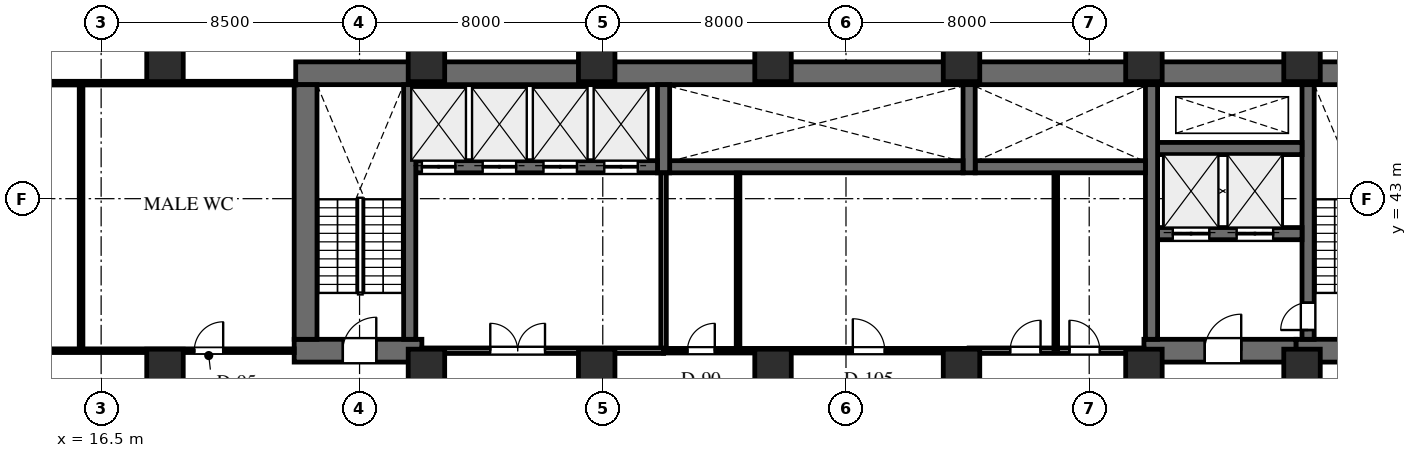
"""IFC4 building model, lengths in metres.
Left out: names, types, materials, properties, quantities, classifications, styles, units other than length and angle.
Written with IfcOpenShell. Run it as: python <this file> out.ifc"""

import sys

from ifc_helpers import new_model, si_unit, direction, frame, frame_2d, origin, origin_2d, place, context, subcontext, project, spatial, rectangle, extrude, element, fill, save


model = new_model("IFC4")
c1 = context("Model", 3, precision=1e-05, world=origin(), true_north=direction((0.0, 1.0)))
c2 = subcontext(c1, "Body", "Model", "MODEL_VIEW")
j1 = project(units=[si_unit("LENGTHUNIT", "METRE"), si_unit("PLANEANGLEUNIT", "RADIAN")], contexts=[c1])
p1 = place(None, origin())
s1 = spatial("IfcSite", under=j1, at=p1, CompositionType="ELEMENT")
p2 = place(p1, origin())
s2 = spatial("IfcBuilding", under=s1, at=p2, CompositionType="ELEMENT")
p3 = place(p2, frame((0.0, 0.0, 37.5)))
s3 = spatial("IfcBuildingStorey", under=s2, at=p3, CompositionType="ELEMENT", Elevation=37.5)
p4 = place(p3, frame((22.9, 47.125, 0.0), z_axis=(0.0, 0.0, 1.0), x_axis=(1.0, 0.0, 0.0)))
e1 = element("IfcWall", 1, at=p4, inside=s3, PredefinedType="SHEAR", context=c2, shape_type="SweptSolid", body=[
    extrude(rectangle(XDim=43.7, YDim=0.75, at=frame_2d((21.85, 0.0))), origin(), (0.0, 0.0, 1.0), 4.0),
])
p5 = place(p3, frame((55.8, 38.0, 0.0), z_axis=(0.0, 0.0, 1.0), x_axis=(1.0, 0.0, 0.0)))
e2 = element("IfcWall", 2, at=p5, inside=s3, PredefinedType="SHEAR", context=c2, shape_type="SweptSolid", body=[
    extrude(rectangle(XDim=10.8, YDim=0.75, at=frame_2d((5.4, 0.0))), origin(), (0.0, 0.0, 1.0), 4.0),
])
p6 = place(p5, frame((1.5, 0.0, 0.0)))
e3 = element("IfcOpeningElement", 3, at=p6, cuts=e2, PredefinedType="OPENING", context=c2, shape_type="SweptSolid", body=[
    extrude(rectangle(XDim=1.1, YDim=2.2, at=frame_2d((0.55, 1.1))), frame((0.0, 0.385, 0.0), z_axis=(0.0, -1.0, 0.0), x_axis=(1.0, 0.0, 0.0)), (0.0, 0.0, 1.0), 0.77),
])
p7 = place(p5, frame((4.82, 0.0, 0.0)))
e4 = element("IfcOpeningElement", 4, at=p7, cuts=e2, PredefinedType="OPENING", context=c2, shape_type="SweptSolid", body=[
    extrude(rectangle(XDim=1.0, YDim=2.15, at=frame_2d((0.5, 1.075))), frame((0.0, 0.385, 0.0), z_axis=(0.0, -1.0, 0.0), x_axis=(1.0, 0.0, 0.0)), (0.0, 0.0, 1.0), 0.77),
])
p8 = place(p5, frame((8.05, 0.0, 0.0)))
e5 = element("IfcOpeningElement", 5, at=p8, cuts=e2, PredefinedType="OPENING", context=c2, shape_type="SweptSolid", body=[
    extrude(rectangle(XDim=1.1, YDim=2.2, at=frame_2d((0.55, 1.1))), frame((0.0, 0.385, 0.0), z_axis=(0.0, -1.0, 0.0), x_axis=(1.0, 0.0, 0.0)), (0.0, 0.0, 1.0), 0.77),
])
p9 = place(p3, frame((56.2, 38.375, 0.0), z_axis=(0.0, 0.0, 1.0), x_axis=(0.0, 1.0, 0.0)))
e6 = element("IfcWall", 6, at=p9, inside=s3, PredefinedType="SHEAR", context=c2, shape_type="SweptSolid", body=[
    extrude(rectangle(XDim=8.375, YDim=0.4, at=frame_2d((4.188, 0.0))), origin(), (0.0, 0.0, 1.0), 4.0),
])
p10 = place(p9, frame((0.305, 0.0, 0.0)))
e7 = element("IfcOpeningElement", 7, at=p10, cuts=e6, PredefinedType="OPENING", context=c2, shape_type="SweptSolid", body=[
    extrude(rectangle(XDim=0.9, YDim=2.15, at=frame_2d((0.45, 1.075))), frame((0.0, 0.21, 0.0), z_axis=(0.0, -1.0, 0.0), x_axis=(1.0, 0.0, 0.0)), (0.0, 0.0, 1.0), 0.42),
])
p11 = place(p3, frame((50.8, 38.0, 0.0), z_axis=(0.0, 0.0, 1.0), x_axis=(1.0, 0.0, 0.0)))
e8 = element("IfcWall", 8, at=p11, inside=s3, PredefinedType="SHEAR", context=c2, shape_type="SweptSolid", body=[
    extrude(rectangle(XDim=5.0, YDim=0.75, at=frame_2d((2.5, 0.0))), origin(), (0.0, 0.0, 1.0), 4.0),
])
p12 = place(p11, frame((2.0, 0.0, 0.0)))
e9 = element("IfcOpeningElement", 9, at=p12, cuts=e8, PredefinedType="OPENING", context=c2, shape_type="SweptSolid", body=[
    extrude(rectangle(XDim=1.2, YDim=2.2, at=frame_2d((0.6, 1.1))), frame((0.0, 0.385, 0.0), z_axis=(0.0, -1.0, 0.0), x_axis=(1.0, 0.0, 0.0)), (0.0, 0.0, 1.0), 0.77),
])
p13 = place(p3, frame((51.25, 41.85, 0.0), z_axis=(0.0, 0.0, 1.0), x_axis=(1.0, 0.0, 0.0)))
e10 = element("IfcWall", 10, at=p13, inside=s3, PredefinedType="SHEAR", context=c2, shape_type="SweptSolid", body=[
    extrude(rectangle(XDim=4.75, YDim=0.4, at=frame_2d((2.375, 0.0))), origin(), (0.0, 0.0, 1.0), 4.0),
])
p14 = place(p13, frame((0.5, 0.0, 0.0)))
e11 = element("IfcOpeningElement", 11, at=p14, cuts=e10, PredefinedType="OPENING", context=c2, shape_type="SweptSolid", body=[
    extrude(rectangle(XDim=1.2, YDim=2.2, at=frame_2d((0.6, 1.1))), frame((0.0, 0.21, 0.0), z_axis=(0.0, -1.0, 0.0), x_axis=(1.0, 0.0, 0.0)), (0.0, 0.0, 1.0), 0.42),
])
p15 = place(p13, frame((2.6, 0.0, 0.0)))
e12 = element("IfcOpeningElement", 12, at=p15, cuts=e10, PredefinedType="OPENING", context=c2, shape_type="SweptSolid", body=[
    extrude(rectangle(XDim=1.2, YDim=2.2, at=frame_2d((0.6, 1.1))), frame((0.0, 0.21, 0.0), z_axis=(0.0, -1.0, 0.0), x_axis=(1.0, 0.0, 0.0)), (0.0, 0.0, 1.0), 0.42),
])
p16 = place(p3, frame((51.25, 44.65, 0.0), z_axis=(0.0, 0.0, 1.0), x_axis=(1.0, 0.0, 0.0)))
e13 = element("IfcWall", 13, at=p16, inside=s3, PredefinedType="SHEAR", context=c2, shape_type="SweptSolid", body=[
    extrude(rectangle(XDim=4.75, YDim=0.4, at=frame_2d((2.375, 0.0))), origin(), (0.0, 0.0, 1.0), 4.0),
])
p17 = place(p3, frame((51.05, 38.375, 0.0), z_axis=(0.0, 0.0, 1.0), x_axis=(0.0, 1.0, 0.0)))
e14 = element("IfcWall", 14, at=p17, inside=s3, PredefinedType="SHEAR", context=c2, shape_type="SweptSolid", body=[
    extrude(rectangle(XDim=8.375, YDim=0.4, at=frame_2d((4.188, 0.0))), origin(), (0.0, 0.0, 1.0), 4.0),
])
p18 = place(p3, frame((45.25, 44.05, 0.0), z_axis=(0.0, 0.0, 1.0), x_axis=(1.0, 0.0, 0.0)))
e15 = element("IfcWall", 15, at=p18, inside=s3, PredefinedType="SHEAR", context=c2, shape_type="SweptSolid", body=[
    extrude(rectangle(XDim=5.6, YDim=0.4, at=frame_2d((2.8, 0.0))), origin(), (0.0, 0.0, 1.0), 4.0),
])
p19 = place(p3, frame((45.05, 43.85, 0.0), z_axis=(0.0, 0.0, 1.0), x_axis=(0.0, 1.0, 0.0)))
e16 = element("IfcWall", 16, at=p19, inside=s3, PredefinedType="SHEAR", context=c2, shape_type="SweptSolid", body=[
    extrude(rectangle(XDim=2.9, YDim=0.4, at=frame_2d((1.45, 0.0))), origin(), (0.0, 0.0, 1.0), 4.0),
])
p20 = place(p3, frame((35.2, 44.05, 0.0), z_axis=(0.0, 0.0, 1.0), x_axis=(1.0, 0.0, 0.0)))
e17 = element("IfcWall", 17, at=p20, inside=s3, PredefinedType="SHEAR", context=c2, shape_type="SweptSolid", body=[
    extrude(rectangle(XDim=9.65, YDim=0.4, at=frame_2d((4.825, 0.0))), origin(), (0.0, 0.0, 1.0), 4.0),
])
p21 = place(p3, frame((35.0, 43.85, 0.0), z_axis=(0.0, 0.0, 1.0), x_axis=(0.0, 1.0, 0.0)))
e18 = element("IfcWall", 18, at=p21, inside=s3, PredefinedType="SHEAR", context=c2, shape_type="SweptSolid", body=[
    extrude(rectangle(XDim=2.9, YDim=0.4, at=frame_2d((1.45, 0.0))), origin(), (0.0, 0.0, 1.0), 4.0),
])
p22 = place(p3, frame((26.85, 44.05, 0.0), z_axis=(0.0, 0.0, 1.0), x_axis=(1.0, 0.0, 0.0)))
e19 = element("IfcWall", 19, at=p22, inside=s3, PredefinedType="SHEAR", context=c2, shape_type="SweptSolid", body=[
    extrude(rectangle(XDim=7.95, YDim=0.4, at=frame_2d((3.975, 0.0))), origin(), (0.0, 0.0, 1.0), 4.0),
])
p23 = place(p22, frame((0.2, 0.0, 0.0)))
e20 = element("IfcOpeningElement", 20, at=p23, cuts=e19, PredefinedType="OPENING", context=c2, shape_type="SweptSolid", body=[
    extrude(rectangle(XDim=1.1, YDim=2.2, at=frame_2d((0.55, 1.1))), frame((0.0, 0.21, 0.0), z_axis=(0.0, -1.0, 0.0), x_axis=(1.0, 0.0, 0.0)), (0.0, 0.0, 1.0), 0.42),
])
p24 = place(p22, frame((2.2, 0.0, 0.0)))
e21 = element("IfcOpeningElement", 21, at=p24, cuts=e19, PredefinedType="OPENING", context=c2, shape_type="SweptSolid", body=[
    extrude(rectangle(XDim=1.1, YDim=2.2, at=frame_2d((0.55, 1.1))), frame((0.0, 0.21, 0.0), z_axis=(0.0, -1.0, 0.0), x_axis=(1.0, 0.0, 0.0)), (0.0, 0.0, 1.0), 0.42),
])
p25 = place(p22, frame((4.2, 0.0, 0.0)))
e22 = element("IfcOpeningElement", 22, at=p25, cuts=e19, PredefinedType="OPENING", context=c2, shape_type="SweptSolid", body=[
    extrude(rectangle(XDim=1.1, YDim=2.2, at=frame_2d((0.55, 1.1))), frame((0.0, 0.21, 0.0), z_axis=(0.0, -1.0, 0.0), x_axis=(1.0, 0.0, 0.0)), (0.0, 0.0, 1.0), 0.42),
])
p26 = place(p22, frame((6.2, 0.0, 0.0)))
e23 = element("IfcOpeningElement", 23, at=p26, cuts=e19, PredefinedType="OPENING", context=c2, shape_type="SweptSolid", body=[
    extrude(rectangle(XDim=1.1, YDim=2.2, at=frame_2d((0.55, 1.1))), frame((0.0, 0.21, 0.0), z_axis=(0.0, -1.0, 0.0), x_axis=(1.0, 0.0, 0.0)), (0.0, 0.0, 1.0), 0.42),
])
p27 = place(p3, frame((22.85, 38.0, 0.0), z_axis=(0.0, 0.0, 1.0), x_axis=(1.0, 0.0, 0.0)))
e24 = element("IfcWall", 24, at=p27, inside=s3, PredefinedType="SHEAR", context=c2, shape_type="SweptSolid", body=[
    extrude(rectangle(XDim=4.2, YDim=0.75, at=frame_2d((2.1, 0.0))), origin(), (0.0, 0.0, 1.0), 4.0),
])
p28 = place(p27, frame((1.6, 0.0, 0.0)))
e25 = element("IfcOpeningElement", 25, at=p28, cuts=e24, PredefinedType="OPENING", context=c2, shape_type="SweptSolid", body=[
    extrude(rectangle(XDim=1.1, YDim=2.2, at=frame_2d((0.55, 1.1))), frame((0.0, 0.385, 0.0), z_axis=(0.0, -1.0, 0.0), x_axis=(1.0, 0.0, 0.0)), (0.0, 0.0, 1.0), 0.77),
])
p29 = place(p3, frame((23.225, 38.375, 0.0), z_axis=(0.0, 0.0, 1.0), x_axis=(0.0, 1.0, 0.0)))
e26 = element("IfcWall", 26, at=p29, inside=s3, PredefinedType="SHEAR", context=c2, shape_type="SweptSolid", body=[
    extrude(rectangle(XDim=8.375, YDim=0.75, at=frame_2d((4.188, 0.0))), origin(), (0.0, 0.0, 1.0), 4.0),
])
p30 = place(p3, frame((26.65, 38.375, 0.0), z_axis=(0.0, 0.0, 1.0), x_axis=(0.0, 1.0, 0.0)))
e27 = element("IfcWall", 27, at=p30, inside=s3, PredefinedType="SHEAR", context=c2, shape_type="SweptSolid", body=[
    extrude(rectangle(XDim=8.375, YDim=0.4, at=frame_2d((4.188, 0.0))), origin(), (0.0, 0.0, 1.0), 4.0),
])
for number, where, z_axis, x_axis in (
    (28, (56.0, 47.55, 0.0), (0.0, 0.0, 1.0), (1.0, 0.0, 0.0)),
    (29, (56.0, 37.35, 0.0), (0.0, 0.0, 1.0), (1.0, 0.0, 0.0)),
    (30, (50.8, 47.55, 0.0), (0.0, 0.0, 1.0), (1.0, 0.0, 0.0)),
    (31, (50.8, 37.35, 0.0), (0.0, 0.0, 1.0), (1.0, 0.0, 0.0)),
    (32, (44.8, 37.35, 0.0), (0.0, 0.0, 1.0), (1.0, 0.0, 0.0)),
    (33, (44.8, 47.55, 0.0), (0.0, 0.0, 1.0), (1.0, 0.0, 0.0)),
    (34, (38.6, 37.35, 0.0), (0.0, 0.0, 1.0), (1.0, 0.0, 0.0)),
    (35, (38.6, 47.55, 0.0), (0.0, 0.0, 1.0), (1.0, 0.0, 0.0)),
    (36, (32.8, 37.35, 0.0), (0.0, 0.0, 1.0), (1.0, 0.0, 0.0)),
    (37, (32.8, 47.55, 0.0), (0.0, 0.0, 1.0), (1.0, 0.0, 0.0)),
    (38, (27.2, 37.35, 0.0), (0.0, 0.0, 1.0), (1.0, 0.0, 0.0)),
    (39, (27.2, 47.55, 0.0), (0.0, 0.0, 1.0), (1.0, 0.0, 0.0)),
    (40, (18.6, 37.35, 0.0), (0.0, 0.0, 1.0), (1.0, 0.0, 0.0)),
    (41, (18.6, 47.55, 0.0), (0.0, 0.0, 1.0), (1.0, 0.0, 0.0)),
):
    element("IfcColumn", number, at=place(p3, frame(where, z_axis=z_axis, x_axis=x_axis)), inside=s3, PredefinedType="COLUMN", context=c2, shape_type="SweptSolid", body=[
        extrude(rectangle(XDim=1.2, YDim=1.4, at=origin_2d()), origin(), (0.0, 0.0, 1.0), 4.0),
    ])
p31 = place(p3, frame((45.05, 38.0, 0.0), z_axis=(0.0, 0.0, 1.0), x_axis=(1.0, 0.0, 0.0)))
e42 = element("IfcWall", 42, at=p31, inside=s3, PredefinedType="STANDARD", context=c2, shape_type="SweptSolid", body=[
    extrude(rectangle(XDim=5.75, YDim=0.18, at=frame_2d((2.875, 0.0))), origin(), (0.0, 0.0, 1.0), 2.813),
])
p32 = place(p31, frame((1.35, 0.0, 0.0)))
e43 = element("IfcOpeningElement", 43, at=p32, cuts=e42, PredefinedType="OPENING", context=c2, shape_type="SweptSolid", body=[
    extrude(rectangle(XDim=1.0, YDim=2.15, at=frame_2d((0.5, 1.075))), frame((0.0, 0.1, 0.0), z_axis=(0.0, -1.0, 0.0), x_axis=(1.0, 0.0, 0.0)), (0.0, 0.0, 1.0), 0.2),
])
p33 = place(p31, frame((3.3, 0.0, 0.0)))
e44 = element("IfcOpeningElement", 44, at=p33, cuts=e42, PredefinedType="OPENING", context=c2, shape_type="SweptSolid", body=[
    extrude(rectangle(XDim=1.0, YDim=2.15, at=frame_2d((0.5, 1.075))), frame((0.0, 0.1, 0.0), z_axis=(0.0, -1.0, 0.0), x_axis=(1.0, 0.0, 0.0)), (0.0, 0.0, 1.0), 0.2),
])
p34 = place(p3, frame((47.9, 38.068, 0.0), z_axis=(0.0, 0.0, 1.0), x_axis=(0.0, 1.0, 0.0)))
e45 = element("IfcWall", 45, at=p34, inside=s3, PredefinedType="PARTITIONING", context=c2, shape_type="SweptSolid", body=[
    extrude(rectangle(XDim=5.774, YDim=0.12, at=frame_2d((2.887, 0.0))), origin(), (0.0, 0.0, 1.0), 3.74),
])
p35 = place(p3, frame((35.0, 38.0, 0.0), z_axis=(0.0, 0.0, 1.0), x_axis=(0.0, 1.0, 0.0)))
e46 = element("IfcWall", 46, at=p35, inside=s3, PredefinedType="STANDARD", context=c2, shape_type="SweptSolid", body=[
    extrude(rectangle(XDim=5.85, YDim=0.18, at=frame_2d((2.925, 0.0))), origin(), (0.0, 0.0, 1.0), 3.74),
])
p36 = place(p3, frame((27.05, 38.0, 0.0), z_axis=(0.0, 0.0, 1.0), x_axis=(1.0, 0.0, 0.0)))
e47 = element("IfcWall", 47, at=p36, inside=s3, PredefinedType="STANDARD", context=c2, shape_type="SweptSolid", body=[
    extrude(rectangle(XDim=7.95, YDim=0.18, at=frame_2d((3.975, 0.0))), origin(), (0.0, 0.0, 1.0), 2.813),
])
p37 = place(p36, frame((2.25, 0.0, 0.0)))
e48 = element("IfcOpeningElement", 48, at=p37, cuts=e47, PredefinedType="OPENING", context=c2, shape_type="SweptSolid", body=[
    extrude(rectangle(XDim=1.8, YDim=2.2, at=frame_2d((0.9, 1.1))), frame((0.0, 0.1, 0.0), z_axis=(0.0, -1.0, 0.0), x_axis=(1.0, 0.0, 0.0)), (0.0, 0.0, 1.0), 0.2),
])
p38 = place(p3, frame((35.0, 38.0, 0.0), z_axis=(0.0, 0.0, 1.0), x_axis=(1.0, 0.0, 0.0)))
e49 = element("IfcWall", 49, at=p38, inside=s3, PredefinedType="PARTITIONING", context=c2, shape_type="SweptSolid", body=[
    extrude(rectangle(XDim=10.05, YDim=0.15, at=frame_2d((5.025, 0.0))), origin(), (0.0, 0.0, 1.0), 2.813),
])
p39 = place(p38, frame((0.785, 0.0, 0.0)))
e50 = element("IfcOpeningElement", 50, at=p39, cuts=e49, PredefinedType="OPENING", context=c2, shape_type="SweptSolid", body=[
    extrude(rectangle(XDim=0.9, YDim=2.1, at=frame_2d((0.45, 1.05))), frame((0.0, 0.085, 0.0), z_axis=(0.0, -1.0, 0.0), x_axis=(1.0, 0.0, 0.0)), (0.0, 0.0, 1.0), 0.17),
])
p40 = place(p38, frame((6.225, 0.0, 0.0)))
e51 = element("IfcOpeningElement", 51, at=p40, cuts=e49, PredefinedType="OPENING", context=c2, shape_type="SweptSolid", body=[
    extrude(rectangle(XDim=1.05, YDim=2.2, at=frame_2d((0.525, 1.1))), frame((0.0, 0.085, 0.0), z_axis=(0.0, -1.0, 0.0), x_axis=(1.0, 0.0, 0.0)), (0.0, 0.0, 1.0), 0.17),
])
p41 = place(p3, frame((37.45, 38.068, 0.0), z_axis=(0.0, 0.0, 1.0), x_axis=(0.0, 1.0, 0.0)))
e52 = element("IfcWall", 52, at=p41, inside=s3, PredefinedType="PARTITIONING", context=c2, shape_type="SweptSolid", body=[
    extrude(rectangle(XDim=5.774, YDim=0.12, at=frame_2d((2.887, 0.0))), origin(), (0.0, 0.0, 1.0), 3.74),
])
p42 = place(p3, frame((6.22, 38.0, 0.0), z_axis=(0.0, 0.0, 1.0), x_axis=(1.0, 0.0, 0.0)))
e53 = element("IfcWall", 53, at=p42, inside=s3, PredefinedType="PARTITIONING", context=c2, shape_type="SweptSolid", body=[
    extrude(rectangle(XDim=16.63, YDim=0.12, at=frame_2d((8.315, 0.0))), origin(), (0.0, 0.0, 1.0), 2.813),
])
p43 = place(p42, frame((0.424, 0.0, 0.0)))
e54 = element("IfcOpeningElement", 54, at=p43, cuts=e53, PredefinedType="OPENING", context=c2, shape_type="SweptSolid", body=[
    extrude(rectangle(XDim=0.95, YDim=2.15, at=frame_2d((0.475, 1.075))), frame((0.0, 0.07, 0.0), z_axis=(0.0, -1.0, 0.0), x_axis=(1.0, 0.0, 0.0)), (0.0, 0.0, 1.0), 0.14),
])
p44 = place(p42, frame((5.444, 0.0, 0.0)))
e55 = element("IfcOpeningElement", 55, at=p44, cuts=e53, PredefinedType="OPENING", context=c2, shape_type="SweptSolid", body=[
    extrude(rectangle(XDim=0.95, YDim=2.15, at=frame_2d((0.475, 1.075))), frame((0.0, 0.07, 0.0), z_axis=(0.0, -1.0, 0.0), x_axis=(1.0, 0.0, 0.0)), (0.0, 0.0, 1.0), 0.14),
])
p45 = place(p42, frame((13.344, 0.0, 0.0)))
e56 = element("IfcOpeningElement", 56, at=p45, cuts=e53, PredefinedType="OPENING", context=c2, shape_type="SweptSolid", body=[
    extrude(rectangle(XDim=0.95, YDim=2.15, at=frame_2d((0.475, 1.075))), frame((0.0, 0.07, 0.0), z_axis=(0.0, -1.0, 0.0), x_axis=(1.0, 0.0, 0.0)), (0.0, 0.0, 1.0), 0.14),
])
p46 = place(p3, frame((6.22, 46.8, 0.0), z_axis=(0.0, 0.0, 1.0), x_axis=(1.0, 0.0, 0.0)))
e57 = element("IfcWall", 57, at=p46, inside=s3, PredefinedType="PARTITIONING", context=c2, shape_type="SweptSolid", body=[
    extrude(rectangle(XDim=16.68, YDim=0.12, at=frame_2d((8.34, 0.0))), origin(), (0.0, 0.0, 1.0), 2.813),
])
p47 = place(p3, frame((15.84, 38.068, 0.0), z_axis=(0.0, 0.0, 1.0), x_axis=(0.0, 1.0, 0.0)))
e58 = element("IfcWall", 58, at=p47, inside=s3, PredefinedType="PARTITIONING", context=c2, shape_type="SweptSolid", body=[
    extrude(rectangle(XDim=8.664, YDim=0.12, at=frame_2d((4.332, 0.0))), origin(), (0.0, 0.0, 1.0), 3.74),
])
p48 = place(p12, origin())
e59 = element("IfcDoor", 59, at=p48, inside=s3, OperationType="SINGLE_SWING_RIGHT", PredefinedType="DOOR", context=c2, shape_type="SweptSolid", body=[
    extrude(rectangle(XDim=1.2, YDim=2.2, at=frame_2d((0.6, 1.1))), frame((0.0, 0.025, 0.0), z_axis=(0.0, -1.0, 0.0), x_axis=(1.0, 0.0, 0.0)), (0.0, 0.0, 1.0), 0.05),
])
fill(e9, e59)
p49 = place(p10, origin())
e60 = element("IfcDoor", 60, at=p49, inside=s3, OperationType="SINGLE_SWING_LEFT", PredefinedType="DOOR", context=c2, shape_type="SweptSolid", body=[
    extrude(rectangle(XDim=0.9, YDim=2.15, at=frame_2d((0.45, 1.075))), frame((0.0, 0.025, 0.0), z_axis=(0.0, -1.0, 0.0), x_axis=(1.0, 0.0, 0.0)), (0.0, 0.0, 1.0), 0.05),
])
fill(e7, e60)
p50 = place(p28, origin())
e61 = element("IfcDoor", 61, at=p50, inside=s3, OperationType="SINGLE_SWING_RIGHT", PredefinedType="DOOR", context=c2, shape_type="SweptSolid", body=[
    extrude(rectangle(XDim=1.1, YDim=2.2, at=frame_2d((0.55, 1.1))), frame((0.0, 0.025, 0.0), z_axis=(0.0, -1.0, 0.0), x_axis=(1.0, 0.0, 0.0)), (0.0, 0.0, 1.0), 0.05),
])
fill(e25, e61)
p51 = place(p23, origin())
e62 = element("IfcDoor", 62, at=p51, inside=s3, OperationType="DOUBLE_DOOR_SLIDING", PredefinedType="DOOR", context=c2, shape_type="SweptSolid", body=[
    extrude(rectangle(XDim=1.1, YDim=2.2, at=frame_2d((0.55, 1.1))), frame((0.0, 0.025, 0.0), z_axis=(0.0, -1.0, 0.0), x_axis=(1.0, 0.0, 0.0)), (0.0, 0.0, 1.0), 0.05),
])
fill(e20, e62)
p52 = place(p24, origin())
e63 = element("IfcDoor", 63, at=p52, inside=s3, OperationType="DOUBLE_DOOR_SLIDING", PredefinedType="DOOR", context=c2, shape_type="SweptSolid", body=[
    extrude(rectangle(XDim=1.1, YDim=2.2, at=frame_2d((0.55, 1.1))), frame((0.0, 0.025, 0.0), z_axis=(0.0, -1.0, 0.0), x_axis=(1.0, 0.0, 0.0)), (0.0, 0.0, 1.0), 0.05),
])
fill(e21, e63)
p53 = place(p25, origin())
e64 = element("IfcDoor", 64, at=p53, inside=s3, OperationType="DOUBLE_DOOR_SLIDING", PredefinedType="DOOR", context=c2, shape_type="SweptSolid", body=[
    extrude(rectangle(XDim=1.1, YDim=2.2, at=frame_2d((0.55, 1.1))), frame((0.0, 0.025, 0.0), z_axis=(0.0, -1.0, 0.0), x_axis=(1.0, 0.0, 0.0)), (0.0, 0.0, 1.0), 0.05),
])
fill(e22, e64)
p54 = place(p26, origin())
e65 = element("IfcDoor", 65, at=p54, inside=s3, OperationType="DOUBLE_DOOR_SLIDING", PredefinedType="DOOR", context=c2, shape_type="SweptSolid", body=[
    extrude(rectangle(XDim=1.1, YDim=2.2, at=frame_2d((0.55, 1.1))), frame((0.0, 0.025, 0.0), z_axis=(0.0, -1.0, 0.0), x_axis=(1.0, 0.0, 0.0)), (0.0, 0.0, 1.0), 0.05),
])
fill(e23, e65)
p55 = place(p14, origin())
e66 = element("IfcDoor", 66, at=p55, inside=s3, OperationType="DOUBLE_DOOR_SLIDING", PredefinedType="DOOR", context=c2, shape_type="SweptSolid", body=[
    extrude(rectangle(XDim=1.2, YDim=2.2, at=frame_2d((0.6, 1.1))), frame((0.0, 0.025, 0.0), z_axis=(0.0, -1.0, 0.0), x_axis=(1.0, 0.0, 0.0)), (0.0, 0.0, 1.0), 0.05),
])
fill(e11, e66)
p56 = place(p15, origin())
e67 = element("IfcDoor", 67, at=p56, inside=s3, OperationType="DOUBLE_DOOR_SLIDING", PredefinedType="DOOR", context=c2, shape_type="SweptSolid", body=[
    extrude(rectangle(XDim=1.2, YDim=2.2, at=frame_2d((0.6, 1.1))), frame((0.0, 0.025, 0.0), z_axis=(0.0, -1.0, 0.0), x_axis=(1.0, 0.0, 0.0)), (0.0, 0.0, 1.0), 0.05),
])
fill(e12, e67)
p57 = place(p32, origin())
e68 = element("IfcDoor", 68, at=p57, inside=s3, OperationType="SINGLE_SWING_RIGHT", PredefinedType="DOOR", context=c2, shape_type="SweptSolid", body=[
    extrude(rectangle(XDim=1.0, YDim=2.15, at=frame_2d((0.5, 1.075))), frame((0.0, 0.025, 0.0), z_axis=(0.0, -1.0, 0.0), x_axis=(1.0, 0.0, 0.0)), (0.0, 0.0, 1.0), 0.05),
])
fill(e43, e68)
p58 = place(p33, origin())
e69 = element("IfcDoor", 69, at=p58, inside=s3, OperationType="SINGLE_SWING_LEFT", PredefinedType="DOOR", context=c2, shape_type="SweptSolid", body=[
    extrude(rectangle(XDim=1.0, YDim=2.15, at=frame_2d((0.5, 1.075))), frame((0.0, 0.025, 0.0), z_axis=(0.0, -1.0, 0.0), x_axis=(1.0, 0.0, 0.0)), (0.0, 0.0, 1.0), 0.05),
])
fill(e44, e69)
p59 = place(p37, origin())
e70 = element("IfcDoor", 70, at=p59, inside=s3, OperationType="DOUBLE_DOOR_SINGLE_SWING", PredefinedType="DOOR", context=c2, shape_type="SweptSolid", body=[
    extrude(rectangle(XDim=1.8, YDim=2.2, at=frame_2d((0.9, 1.1))), frame((0.0, 0.025, 0.0), z_axis=(0.0, -1.0, 0.0), x_axis=(1.0, 0.0, 0.0)), (0.0, 0.0, 1.0), 0.05),
])
fill(e48, e70)
p60 = place(p39, origin())
e71 = element("IfcDoor", 71, at=p60, inside=s3, OperationType="SINGLE_SWING_RIGHT", PredefinedType="DOOR", context=c2, shape_type="SweptSolid", body=[
    extrude(rectangle(XDim=0.9, YDim=2.1, at=frame_2d((0.45, 1.05))), frame((0.0, 0.025, 0.0), z_axis=(0.0, -1.0, 0.0), x_axis=(1.0, 0.0, 0.0)), (0.0, 0.0, 1.0), 0.05),
])
fill(e50, e71)
p61 = place(p40, origin())
e72 = element("IfcDoor", 72, at=p61, inside=s3, OperationType="SINGLE_SWING_LEFT", PredefinedType="DOOR", context=c2, shape_type="SweptSolid", body=[
    extrude(rectangle(XDim=1.05, YDim=2.2, at=frame_2d((0.525, 1.1))), frame((0.0, 0.025, 0.0), z_axis=(0.0, -1.0, 0.0), x_axis=(1.0, 0.0, 0.0)), (0.0, 0.0, 1.0), 0.05),
])
fill(e51, e72)
p62 = place(p45, origin())
e73 = element("IfcDoor", 73, at=p62, inside=s3, OperationType="SINGLE_SWING_RIGHT", PredefinedType="DOOR", context=c2, shape_type="SweptSolid", body=[
    extrude(rectangle(XDim=0.95, YDim=2.15, at=frame_2d((0.475, 1.075))), frame((0.0, 0.025, 0.0), z_axis=(0.0, -1.0, 0.0), x_axis=(1.0, 0.0, 0.0)), (0.0, 0.0, 1.0), 0.05),
])
fill(e56, e73)
save(model, sys.argv[1])
